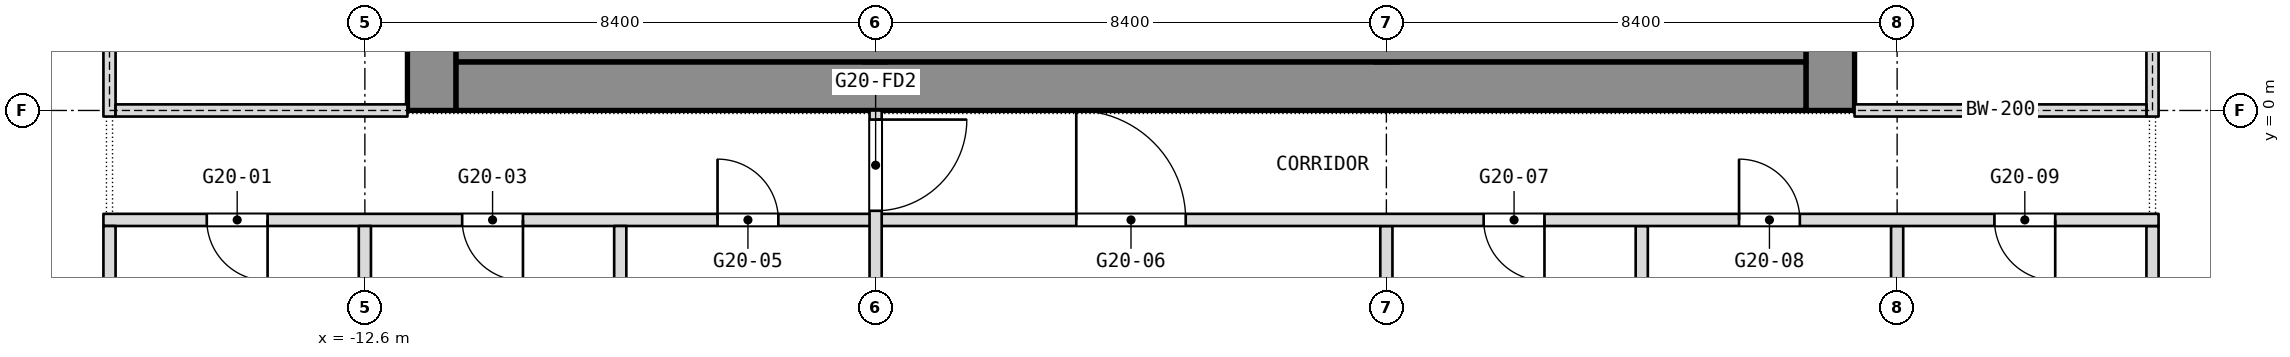
"""IFC4 building model, lengths in metres.
Left out: names, types, materials, properties, quantities, classifications, styles, units other than length and angle.
Written with IfcOpenShell. Run it as: python <this file> out.ifc"""

import sys

from ifc_helpers import new_model, si_unit, direction, frame, frame_2d, origin, place, context, subcontext, project, spatial, rectangle, extrude, element, fill, save


model = new_model("IFC4")
c1 = context("Model", 3, precision=1e-05, world=origin(), true_north=direction((0.0, 1.0)))
c2 = subcontext(c1, "Body", "Model", "MODEL_VIEW")
j1 = project(units=[si_unit("LENGTHUNIT", "METRE"), si_unit("PLANEANGLEUNIT", "RADIAN")], contexts=[c1])
p1 = place(None, origin())
s1 = spatial("IfcSite", under=j1, at=p1, CompositionType="ELEMENT")
p2 = place(p1, origin())
s2 = spatial("IfcBuilding", under=s1, at=p2, CompositionType="ELEMENT")
p3 = place(p2, frame((0.0, 0.0, 234.5)))
s3 = spatial("IfcBuildingStorey", under=s2, at=p3, CompositionType="ELEMENT", Elevation=234.5)
p4 = place(p3, frame((11.5, 0.0, 0.0), z_axis=(0.0, 0.0, 1.0), x_axis=(0.0, 1.0, 0.0)))
e1 = element("IfcWall", 1, at=p4, inside=s3, PredefinedType="SHEAR", context=c2, shape_type="SweptSolid", body=[
    extrude(rectangle(XDim=16.8, YDim=0.8, at=frame_2d((8.4, 0.0))), origin(), (0.0, 0.0, 1.0), 3.6),
])
p5 = place(p4, frame((2.3, 0.0, 0.0)))
e2 = element("IfcOpeningElement", 2, at=p5, cuts=e1, PredefinedType="OPENING", context=c2, shape_type="SweptSolid", body=[
    extrude(rectangle(XDim=1.1, YDim=2.1, at=frame_2d((0.55, 1.05))), frame((0.0, 0.4, 0.0), z_axis=(0.0, -1.0, 0.0), x_axis=(1.0, 0.0, 0.0)), (0.0, 0.0, 1.0), 0.8),
])
p6 = place(p4, frame((4.85, 0.0, 0.0)))
e3 = element("IfcOpeningElement", 3, at=p6, cuts=e1, PredefinedType="OPENING", context=c2, shape_type="SweptSolid", body=[
    extrude(rectangle(XDim=1.1, YDim=2.1, at=frame_2d((0.55, 1.05))), frame((0.0, 0.4, 0.0), z_axis=(0.0, -1.0, 0.0), x_axis=(1.0, 0.0, 0.0)), (0.0, 0.0, 1.0), 0.8),
])
p7 = place(p4, frame((6.825, 0.0, 0.0)))
e4 = element("IfcOpeningElement", 4, at=p7, cuts=e1, PredefinedType="OPENING", context=c2, shape_type="SweptSolid", body=[
    extrude(rectangle(XDim=1.2, YDim=2.1, at=frame_2d((0.6, 1.05))), frame((0.0, 0.4, 0.0), z_axis=(0.0, -1.0, 0.0), x_axis=(1.0, 0.0, 0.0)), (0.0, 0.0, 1.0), 0.8),
])
p8 = place(p4, frame((13.4, 0.0, 0.0)))
e5 = element("IfcOpeningElement", 5, at=p8, cuts=e1, PredefinedType="OPENING", context=c2, shape_type="SweptSolid", body=[
    extrude(rectangle(XDim=1.1, YDim=2.1, at=frame_2d((0.55, 1.05))), frame((0.0, 0.4, 0.0), z_axis=(0.0, -1.0, 0.0), x_axis=(1.0, 0.0, 0.0)), (0.0, 0.0, 1.0), 0.8),
])
p9 = place(p4, frame((10.85, 0.0, 0.0)))
e6 = element("IfcOpeningElement", 6, at=p9, cuts=e1, PredefinedType="OPENING", context=c2, shape_type="SweptSolid", body=[
    extrude(rectangle(XDim=1.1, YDim=2.1, at=frame_2d((0.55, 1.05))), frame((0.0, 0.4, 0.0), z_axis=(0.0, -1.0, 0.0), x_axis=(1.0, 0.0, 0.0)), (0.0, 0.0, 1.0), 0.8),
])
p10 = place(p4, frame((8.775, 0.0, 0.0)))
e7 = element("IfcOpeningElement", 7, at=p10, cuts=e1, PredefinedType="OPENING", context=c2, shape_type="SweptSolid", body=[
    extrude(rectangle(XDim=1.2, YDim=2.1, at=frame_2d((0.6, 1.05))), frame((0.0, 0.4, 0.0), z_axis=(0.0, -1.0, 0.0), x_axis=(1.0, 0.0, 0.0)), (0.0, 0.0, 1.0), 0.8),
])
p11 = place(p3, frame((-11.5, 0.0, 0.0), z_axis=(0.0, 0.0, 1.0), x_axis=(0.0, 1.0, 0.0)))
e8 = element("IfcWall", 8, at=p11, inside=s3, PredefinedType="SHEAR", context=c2, shape_type="SweptSolid", body=[
    extrude(rectangle(XDim=16.8, YDim=0.8, at=frame_2d((8.4, 0.0))), origin(), (0.0, 0.0, 1.0), 3.6),
])
p12 = place(p11, frame((3.6, 0.0, 0.0)))
e9 = element("IfcOpeningElement", 9, at=p12, cuts=e8, PredefinedType="OPENING", context=c2, shape_type="SweptSolid", body=[
    extrude(rectangle(XDim=0.9, YDim=2.1, at=frame_2d((0.45, 1.05))), frame((0.0, 0.4, 0.0), z_axis=(0.0, -1.0, 0.0), x_axis=(1.0, 0.0, 0.0)), (0.0, 0.0, 1.0), 0.8),
])
p13 = place(p11, frame((6.825, 0.0, 0.0)))
e10 = element("IfcOpeningElement", 10, at=p13, cuts=e8, PredefinedType="OPENING", context=c2, shape_type="SweptSolid", body=[
    extrude(rectangle(XDim=1.2, YDim=2.1, at=frame_2d((0.6, 1.05))), frame((0.0, 0.4, 0.0), z_axis=(0.0, -1.0, 0.0), x_axis=(1.0, 0.0, 0.0)), (0.0, 0.0, 1.0), 0.8),
])
p14 = place(p11, frame((14.212, 0.0, 0.0)))
e11 = element("IfcOpeningElement", 11, at=p14, cuts=e8, PredefinedType="OPENING", context=c2, shape_type="SweptSolid", body=[
    extrude(rectangle(XDim=0.9, YDim=2.1, at=frame_2d((0.45, 1.05))), frame((0.0, 0.4, 0.0), z_axis=(0.0, -1.0, 0.0), x_axis=(1.0, 0.0, 0.0)), (0.0, 0.0, 1.0), 0.8),
])
p15 = place(p11, frame((11.587, 0.0, 0.0)))
e12 = element("IfcOpeningElement", 12, at=p15, cuts=e8, PredefinedType="OPENING", context=c2, shape_type="SweptSolid", body=[
    extrude(rectangle(XDim=0.9, YDim=2.1, at=frame_2d((0.45, 1.05))), frame((0.0, 0.4, 0.0), z_axis=(0.0, -1.0, 0.0), x_axis=(1.0, 0.0, 0.0)), (0.0, 0.0, 1.0), 0.8),
])
p16 = place(p11, frame((8.775, 0.0, 0.0)))
e13 = element("IfcOpeningElement", 13, at=p16, cuts=e8, PredefinedType="OPENING", context=c2, shape_type="SweptSolid", body=[
    extrude(rectangle(XDim=1.2, YDim=2.1, at=frame_2d((0.6, 1.05))), frame((0.0, 0.4, 0.0), z_axis=(0.0, -1.0, 0.0), x_axis=(1.0, 0.0, 0.0)), (0.0, 0.0, 1.0), 0.8),
])
p17 = place(p3, frame((-11.1, 0.4, 0.0), z_axis=(0.0, 0.0, 1.0), x_axis=(1.0, 0.0, 0.0)))
e14 = element("IfcWall", 14, at=p17, inside=s3, PredefinedType="SHEAR", context=c2, shape_type="SweptSolid", body=[
    extrude(rectangle(XDim=22.2, YDim=0.8, at=frame_2d((11.1, 0.0))), origin(), (0.0, 0.0, 1.0), 3.6),
])
p18 = place(p3, frame((-4.2, 0.8, 0.0), z_axis=(0.0, 0.0, 1.0), x_axis=(0.0, 1.0, 0.0)))
e15 = element("IfcWall", 15, at=p18, inside=s3, PredefinedType="SHEAR", context=c2, shape_type="SweptSolid", body=[
    extrude(rectangle(XDim=15.2, YDim=0.4, at=frame_2d((7.6, 0.0))), origin(), (0.0, 0.0, 1.0), 3.6),
])
p19 = place(p18, frame((8.5, 0.0, 0.0)))
e16 = element("IfcOpeningElement", 16, at=p19, cuts=e15, PredefinedType="OPENING", context=c2, shape_type="SweptSolid", body=[
    extrude(rectangle(XDim=1.2, YDim=2.1, at=frame_2d((0.6, 1.05))), frame((0.0, 0.2, 0.0), z_axis=(0.0, -1.0, 0.0), x_axis=(1.0, 0.0, 0.0)), (0.0, 0.0, 1.0), 0.4),
])
p20 = place(p3, frame((4.2, 0.8, 0.0), z_axis=(0.0, 0.0, 1.0), x_axis=(0.0, 1.0, 0.0)))
e17 = element("IfcWall", 17, at=p20, inside=s3, PredefinedType="SHEAR", context=c2, shape_type="SweptSolid", body=[
    extrude(rectangle(XDim=15.2, YDim=0.4, at=frame_2d((7.6, 0.0))), origin(), (0.0, 0.0, 1.0), 3.6),
])
p21 = place(p20, frame((5.95, 0.0, 0.0)))
e18 = element("IfcOpeningElement", 18, at=p21, cuts=e17, PredefinedType="OPENING", context=c2, shape_type="SweptSolid", body=[
    extrude(rectangle(XDim=1.2, YDim=2.1, at=frame_2d((0.6, 1.05))), frame((0.0, 0.2, 0.0), z_axis=(0.0, -1.0, 0.0), x_axis=(1.0, 0.0, 0.0)), (0.0, 0.0, 1.0), 0.4),
])
for number, where, z_axis, x_axis in (
    (19, (16.8, -7.8, 0.0), (0.0, 0.0, 1.0), (0.0, 1.0, 0.0)),
    (20, (12.6, -7.8, 0.0), (0.0, 0.0, 1.0), (0.0, 1.0, 0.0)),
):
    element("IfcWall", number, at=place(p3, frame(where, z_axis=z_axis, x_axis=x_axis)), inside=s3, PredefinedType="PARTITIONING", context=c2, shape_type="SweptSolid", body=[
        extrude(rectangle(XDim=5.9, YDim=0.2, at=frame_2d((2.95, 0.0))), origin(), (0.0, 0.0, 1.0), 3.34),
    ])
p22 = place(p3, frame((8.4, -8.0, 0.0), z_axis=(0.0, 0.0, 1.0), x_axis=(0.0, 1.0, 0.0)))
e21 = element("IfcWall", 21, at=p22, inside=s3, PredefinedType="PARTITIONING", context=c2, shape_type="SweptSolid", body=[
    extrude(rectangle(XDim=6.1, YDim=0.2, at=frame_2d((3.05, 0.0))), origin(), (0.0, 0.0, 1.0), 3.34),
])
p23 = place(p3, frame((4.2, -11.6, 0.0), z_axis=(0.0, 0.0, 1.0), x_axis=(0.0, 1.0, 0.0)))
e22 = element("IfcWall", 22, at=p23, inside=s3, PredefinedType="PARTITIONING", context=c2, shape_type="SweptSolid", body=[
    extrude(rectangle(XDim=9.7, YDim=0.2, at=frame_2d((4.85, 0.0))), origin(), (0.0, 0.0, 1.0), 3.34),
])
p24 = place(p3, frame((-16.9, -1.8, 0.0), z_axis=(0.0, 0.0, 1.0), x_axis=(1.0, 0.0, 0.0)))
e23 = element("IfcWall", 23, at=p24, inside=s3, PredefinedType="PARTITIONING", context=c2, shape_type="SweptSolid", body=[
    extrude(rectangle(XDim=33.8, YDim=0.2, at=frame_2d((16.9, 0.0))), origin(), (0.0, 0.0, 1.0), 3.34),
])
p25 = place(p24, frame((1.7, 0.0, 0.0)))
e24 = element("IfcOpeningElement", 24, at=p25, cuts=e23, PredefinedType="OPENING", context=c2, shape_type="SweptSolid", body=[
    extrude(rectangle(XDim=1.0, YDim=2.1, at=frame_2d((0.5, 1.05))), frame((0.0, 0.1, 0.0), z_axis=(0.0, -1.0, 0.0), x_axis=(1.0, 0.0, 0.0)), (0.0, 0.0, 1.0), 0.2),
])
p26 = place(p24, frame((5.9, 0.0, 0.0)))
e25 = element("IfcOpeningElement", 25, at=p26, cuts=e23, PredefinedType="OPENING", context=c2, shape_type="SweptSolid", body=[
    extrude(rectangle(XDim=1.0, YDim=2.1, at=frame_2d((0.5, 1.05))), frame((0.0, 0.1, 0.0), z_axis=(0.0, -1.0, 0.0), x_axis=(1.0, 0.0, 0.0)), (0.0, 0.0, 1.0), 0.2),
])
p27 = place(p24, frame((10.1, 0.0, 0.0)))
e26 = element("IfcOpeningElement", 26, at=p27, cuts=e23, PredefinedType="OPENING", context=c2, shape_type="SweptSolid", body=[
    extrude(rectangle(XDim=1.0, YDim=2.1, at=frame_2d((0.5, 1.05))), frame((0.0, 0.1, 0.0), z_axis=(0.0, -1.0, 0.0), x_axis=(1.0, 0.0, 0.0)), (0.0, 0.0, 1.0), 0.2),
])
p28 = place(p24, frame((16.0, 0.0, 0.0)))
e27 = element("IfcOpeningElement", 27, at=p28, cuts=e23, PredefinedType="OPENING", context=c2, shape_type="SweptSolid", body=[
    extrude(rectangle(XDim=1.8, YDim=2.1, at=frame_2d((0.9, 1.05))), frame((0.0, 0.1, 0.0), z_axis=(0.0, -1.0, 0.0), x_axis=(1.0, 0.0, 0.0)), (0.0, 0.0, 1.0), 0.2),
])
p29 = place(p24, frame((22.7, 0.0, 0.0)))
e28 = element("IfcOpeningElement", 28, at=p29, cuts=e23, PredefinedType="OPENING", context=c2, shape_type="SweptSolid", body=[
    extrude(rectangle(XDim=1.0, YDim=2.1, at=frame_2d((0.5, 1.05))), frame((0.0, 0.1, 0.0), z_axis=(0.0, -1.0, 0.0), x_axis=(1.0, 0.0, 0.0)), (0.0, 0.0, 1.0), 0.2),
])
p30 = place(p24, frame((26.9, 0.0, 0.0)))
e29 = element("IfcOpeningElement", 29, at=p30, cuts=e23, PredefinedType="OPENING", context=c2, shape_type="SweptSolid", body=[
    extrude(rectangle(XDim=1.0, YDim=2.1, at=frame_2d((0.5, 1.05))), frame((0.0, 0.1, 0.0), z_axis=(0.0, -1.0, 0.0), x_axis=(1.0, 0.0, 0.0)), (0.0, 0.0, 1.0), 0.2),
])
p31 = place(p24, frame((31.1, 0.0, 0.0)))
e30 = element("IfcOpeningElement", 30, at=p31, cuts=e23, PredefinedType="OPENING", context=c2, shape_type="SweptSolid", body=[
    extrude(rectangle(XDim=1.0, YDim=2.1, at=frame_2d((0.5, 1.05))), frame((0.0, 0.1, 0.0), z_axis=(0.0, -1.0, 0.0), x_axis=(1.0, 0.0, 0.0)), (0.0, 0.0, 1.0), 0.2),
])
p32 = place(p3, frame((-4.2, -13.6, 0.0), z_axis=(0.0, 0.0, 1.0), x_axis=(0.0, 1.0, 0.0)))
e31 = element("IfcWall", 31, at=p32, inside=s3, PredefinedType="PARTITIONING", context=c2, shape_type="SweptSolid", body=[
    extrude(rectangle(XDim=13.6, YDim=0.2, at=frame_2d((6.8, 0.0))), origin(), (0.0, 0.0, 1.0), 3.34),
])
p33 = place(p32, frame((11.95, 0.0, 0.0)))
e32 = element("IfcOpeningElement", 32, at=p33, cuts=e31, PredefinedType="OPENING", context=c2, shape_type="SweptSolid", body=[
    extrude(rectangle(XDim=1.5, YDim=2.1, at=frame_2d((0.75, 1.05))), frame((0.0, 0.1, 0.0), z_axis=(0.0, -1.0, 0.0), x_axis=(1.0, 0.0, 0.0)), (0.0, 0.0, 1.0), 0.2),
])
p34 = place(p32, frame((0.25, 0.0, 0.0)))
e33 = element("IfcOpeningElement", 33, at=p34, cuts=e31, PredefinedType="OPENING", context=c2, shape_type="SweptSolid", body=[
    extrude(rectangle(XDim=1.5, YDim=2.1, at=frame_2d((0.75, 1.05))), frame((0.0, 0.1, 0.0), z_axis=(0.0, -1.0, 0.0), x_axis=(1.0, 0.0, 0.0)), (0.0, 0.0, 1.0), 0.2),
])
p35 = place(p3, frame((-8.4, -8.0, 0.0), z_axis=(0.0, 0.0, 1.0), x_axis=(0.0, 1.0, 0.0)))
e34 = element("IfcWall", 34, at=p35, inside=s3, PredefinedType="PARTITIONING", context=c2, shape_type="SweptSolid", body=[
    extrude(rectangle(XDim=6.1, YDim=0.2, at=frame_2d((3.05, 0.0))), origin(), (0.0, 0.0, 1.0), 3.34),
])
p36 = place(p3, frame((-12.6, -7.8, 0.0), z_axis=(0.0, 0.0, 1.0), x_axis=(0.0, 1.0, 0.0)))
e35 = element("IfcWall", 35, at=p36, inside=s3, PredefinedType="PARTITIONING", context=c2, shape_type="SweptSolid", body=[
    extrude(rectangle(XDim=5.9, YDim=0.2, at=frame_2d((2.95, 0.0))), origin(), (0.0, 0.0, 1.0), 3.34),
])
p37 = place(p3, frame((-16.8, -8.0, 0.0), z_axis=(0.0, 0.0, 1.0), x_axis=(0.0, 1.0, 0.0)))
e36 = element("IfcWall", 36, at=p37, inside=s3, PredefinedType="PARTITIONING", context=c2, shape_type="SweptSolid", body=[
    extrude(rectangle(XDim=6.1, YDim=0.2, at=frame_2d((3.05, 0.0))), origin(), (0.0, 0.0, 1.0), 3.34),
])
p38 = place(p3, frame((-11.1, 1.15, 0.0), z_axis=(0.0, 0.0, 1.0), x_axis=(1.0, 0.0, 0.0)))
e37 = element("IfcWall", 37, at=p38, inside=s3, PredefinedType="PARTITIONING", context=c2, shape_type="SweptSolid", body=[
    extrude(rectangle(XDim=22.2, YDim=0.7, at=frame_2d((11.1, 0.0))), origin(), (0.0, 0.0, 1.0), 3.34),
])
p39 = place(p3, frame((-16.8, -0.1, 0.0), z_axis=(0.0, 0.0, 1.0), x_axis=(0.0, 1.0, 0.0)))
e38 = element("IfcWall", 38, at=p39, inside=s3, PredefinedType="PARTITIONING", context=c2, shape_type="SweptSolid", body=[
    extrude(rectangle(XDim=17.0, YDim=0.2, at=frame_2d((8.5, 0.0))), origin(), (0.0, 0.0, 1.0), 3.34),
])
p40 = place(p39, frame((2.2, 0.0, 0.0)))
e39 = element("IfcOpeningElement", 39, at=p40, cuts=e38, PredefinedType="OPENING", context=c2, shape_type="SweptSolid", body=[
    extrude(rectangle(XDim=1.8, YDim=2.1, at=frame_2d((0.9, 1.05))), frame((0.0, 0.1, 0.0), z_axis=(0.0, -1.0, 0.0), x_axis=(1.0, 0.0, 0.0)), (0.0, 0.0, 1.0), 0.2),
])
p41 = place(p39, frame((13.0, 0.0, 0.0)))
e40 = element("IfcOpeningElement", 40, at=p41, cuts=e38, PredefinedType="OPENING", context=c2, shape_type="SweptSolid", body=[
    extrude(rectangle(XDim=1.8, YDim=2.1, at=frame_2d((0.9, 1.05))), frame((0.0, 0.1, 0.0), z_axis=(0.0, -1.0, 0.0), x_axis=(1.0, 0.0, 0.0)), (0.0, 0.0, 1.0), 0.2),
])
p42 = place(p3, frame((-16.7, 0.0, 0.0), z_axis=(0.0, 0.0, 1.0), x_axis=(1.0, 0.0, 0.0)))
e41 = element("IfcWall", 41, at=p42, inside=s3, PredefinedType="PARTITIONING", context=c2, shape_type="SweptSolid", body=[
    extrude(rectangle(XDim=4.8, YDim=0.2, at=frame_2d((2.4, 0.0))), origin(), (0.0, 0.0, 1.0), 2.94),
])
p43 = place(p3, frame((16.8, -0.1, 0.0), z_axis=(0.0, 0.0, 1.0), x_axis=(0.0, 1.0, 0.0)))
e42 = element("IfcWall", 42, at=p43, inside=s3, PredefinedType="PARTITIONING", context=c2, shape_type="SweptSolid", body=[
    extrude(rectangle(XDim=17.0, YDim=0.2, at=frame_2d((8.5, 0.0))), origin(), (0.0, 0.0, 1.0), 3.34),
])
p44 = place(p43, frame((2.2, 0.0, 0.0)))
e43 = element("IfcOpeningElement", 43, at=p44, cuts=e42, PredefinedType="OPENING", context=c2, shape_type="SweptSolid", body=[
    extrude(rectangle(XDim=1.8, YDim=2.1, at=frame_2d((0.9, 1.05))), frame((0.0, 0.1, 0.0), z_axis=(0.0, -1.0, 0.0), x_axis=(1.0, 0.0, 0.0)), (0.0, 0.0, 1.0), 0.2),
])
p45 = place(p43, frame((13.0, 0.0, 0.0)))
e44 = element("IfcOpeningElement", 44, at=p45, cuts=e42, PredefinedType="OPENING", context=c2, shape_type="SweptSolid", body=[
    extrude(rectangle(XDim=1.8, YDim=2.1, at=frame_2d((0.9, 1.05))), frame((0.0, 0.1, 0.0), z_axis=(0.0, -1.0, 0.0), x_axis=(1.0, 0.0, 0.0)), (0.0, 0.0, 1.0), 0.2),
])
p46 = place(p3, frame((11.9, 0.0, 0.0), z_axis=(0.0, 0.0, 1.0), x_axis=(1.0, 0.0, 0.0)))
e45 = element("IfcWall", 45, at=p46, inside=s3, PredefinedType="PARTITIONING", context=c2, shape_type="SweptSolid", body=[
    extrude(rectangle(XDim=4.8, YDim=0.2, at=frame_2d((2.4, 0.0))), origin(), (0.0, 0.0, 1.0), 2.94),
])
p47 = place(p25, origin())
e46 = element("IfcDoor", 46, at=p47, inside=s3, OperationType="SINGLE_SWING_LEFT", PredefinedType="DOOR", context=c2, shape_type="SweptSolid", body=[
    extrude(rectangle(XDim=1.0, YDim=2.1, at=frame_2d((0.5, 1.05))), frame((0.0, 0.025, 0.0), z_axis=(0.0, -1.0, 0.0), x_axis=(1.0, 0.0, 0.0)), (0.0, 0.0, 1.0), 0.05),
])
fill(e24, e46)
p48 = place(p26, origin())
e47 = element("IfcDoor", 47, at=p48, inside=s3, OperationType="SINGLE_SWING_LEFT", PredefinedType="DOOR", context=c2, shape_type="SweptSolid", body=[
    extrude(rectangle(XDim=1.0, YDim=2.1, at=frame_2d((0.5, 1.05))), frame((0.0, 0.025, 0.0), z_axis=(0.0, -1.0, 0.0), x_axis=(1.0, 0.0, 0.0)), (0.0, 0.0, 1.0), 0.05),
])
fill(e25, e47)
p49 = place(p27, origin())
e48 = element("IfcDoor", 48, at=p49, inside=s3, OperationType="SINGLE_SWING_RIGHT", PredefinedType="DOOR", context=c2, shape_type="SweptSolid", body=[
    extrude(rectangle(XDim=1.0, YDim=2.1, at=frame_2d((0.5, 1.05))), frame((0.0, 0.025, 0.0), z_axis=(0.0, -1.0, 0.0), x_axis=(1.0, 0.0, 0.0)), (0.0, 0.0, 1.0), 0.05),
])
fill(e26, e48)
p50 = place(p28, origin())
e49 = element("IfcDoor", 49, at=p50, inside=s3, OperationType="DOUBLE_DOOR_SINGLE_SWING", PredefinedType="DOOR", context=c2, shape_type="SweptSolid", body=[
    extrude(rectangle(XDim=1.8, YDim=2.1, at=frame_2d((0.9, 1.05))), frame((0.0, 0.025, 0.0), z_axis=(0.0, -1.0, 0.0), x_axis=(1.0, 0.0, 0.0)), (0.0, 0.0, 1.0), 0.05),
])
fill(e27, e49)
p51 = place(p29, origin())
e50 = element("IfcDoor", 50, at=p51, inside=s3, OperationType="SINGLE_SWING_RIGHT", PredefinedType="DOOR", context=c2, shape_type="SweptSolid", body=[
    extrude(rectangle(XDim=1.0, YDim=2.1, at=frame_2d((0.5, 1.05))), frame((0.0, 0.025, 0.0), z_axis=(0.0, -1.0, 0.0), x_axis=(1.0, 0.0, 0.0)), (0.0, 0.0, 1.0), 0.05),
])
fill(e28, e50)
p52 = place(p30, origin())
e51 = element("IfcDoor", 51, at=p52, inside=s3, OperationType="SINGLE_SWING_LEFT", PredefinedType="DOOR", context=c2, shape_type="SweptSolid", body=[
    extrude(rectangle(XDim=1.0, YDim=2.1, at=frame_2d((0.5, 1.05))), frame((0.0, 0.025, 0.0), z_axis=(0.0, -1.0, 0.0), x_axis=(1.0, 0.0, 0.0)), (0.0, 0.0, 1.0), 0.05),
])
fill(e29, e51)
p53 = place(p31, origin())
e52 = element("IfcDoor", 52, at=p53, inside=s3, OperationType="SINGLE_SWING_RIGHT", PredefinedType="DOOR", context=c2, shape_type="SweptSolid", body=[
    extrude(rectangle(XDim=1.0, YDim=2.1, at=frame_2d((0.5, 1.05))), frame((0.0, 0.025, 0.0), z_axis=(0.0, -1.0, 0.0), x_axis=(1.0, 0.0, 0.0)), (0.0, 0.0, 1.0), 0.05),
])
fill(e30, e52)
p54 = place(p33, origin())
e53 = element("IfcDoor", 53, at=p54, inside=s3, OperationType="DOUBLE_DOOR_DOUBLE_SWING", PredefinedType="DOOR", context=c2, shape_type="SweptSolid", body=[
    extrude(rectangle(XDim=1.5, YDim=2.1, at=frame_2d((0.75, 1.05))), frame((0.0, 0.025, 0.0), z_axis=(0.0, -1.0, 0.0), x_axis=(1.0, 0.0, 0.0)), (0.0, 0.0, 1.0), 0.05),
])
fill(e32, e53)
save(model, sys.argv[1])
